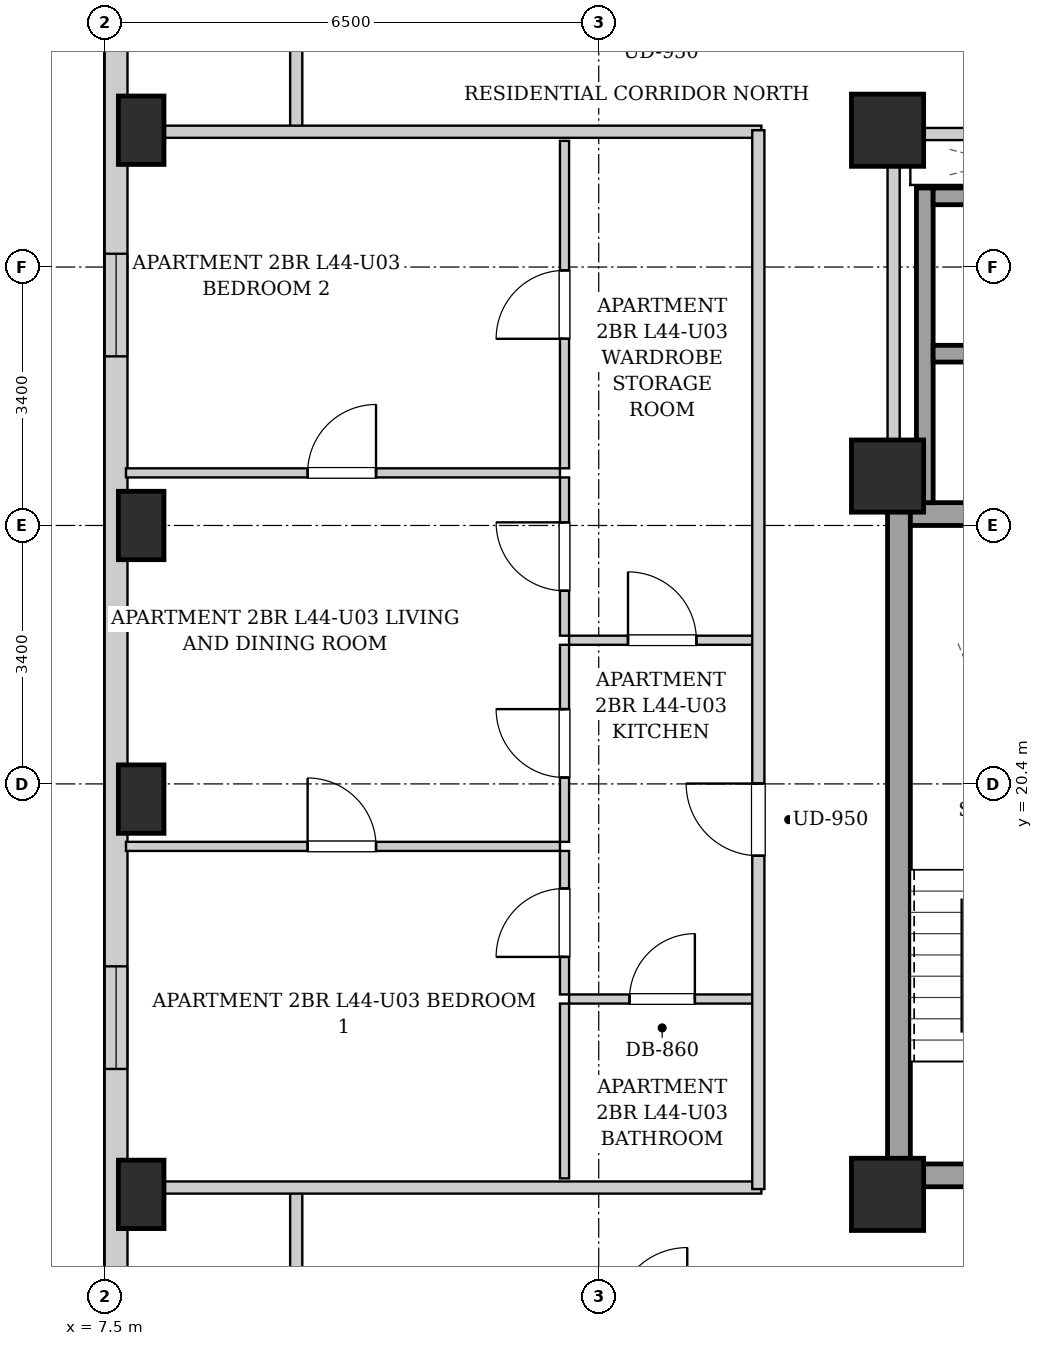
"""IFC4 building model, lengths in metres.
Left out: names, types, materials, properties, quantities, classifications, styles, units other than length and angle.
Written with IfcOpenShell. Run it as: python <this file> out.ifc"""

import sys

from ifc_helpers import new_model, si_unit, direction, frame, frame_2d, origin, origin_2d, place, context, subcontext, project, spatial, rectangle, extrude, element, fill, save


model = new_model("IFC4")
c1 = context("Model", 3, precision=1e-05, world=origin(), true_north=direction((0.0, 1.0)))
c2 = subcontext(c1, "Body", "Model", "MODEL_VIEW")
j1 = project(units=[si_unit("LENGTHUNIT", "METRE"), si_unit("PLANEANGLEUNIT", "RADIAN")], contexts=[c1])
p1 = place(None, origin())
s1 = spatial("IfcSite", under=j1, at=p1, CompositionType="ELEMENT")
p2 = place(p1, origin())
s2 = spatial("IfcBuilding", under=s1, at=p2, CompositionType="ELEMENT")
p3 = place(p2, frame((0.0, 0.0, 153.65)))
s3 = spatial("IfcBuildingStorey", under=s2, at=p3, CompositionType="ELEMENT", Elevation=153.65)
for number, where, z_axis, x_axis in (
    (1, (7.98, 15.0, 0.0), (0.0, 0.0, 1.0), (1.0, 0.0, 0.0)),
    (2, (7.98, 20.2, 0.0), (0.0, 0.0, 1.0), (1.0, 0.0, 0.0)),
    (3, (7.98, 23.8, 0.0), (0.0, 0.0, 1.0), (1.0, 0.0, 0.0)),
    (4, (7.98, 29.0, 0.0), (0.0, 0.0, 1.0), (1.0, 0.0, 0.0)),
):
    element("IfcColumn", number, at=place(p3, frame(where, z_axis=z_axis, x_axis=x_axis)), inside=s3, PredefinedType="COLUMN", context=c2, shape_type="SweptSolid", body=[
        extrude(rectangle(XDim=0.6, YDim=0.9, at=origin_2d()), origin(), (0.0, 0.0, 1.0), 3.25),
    ])
for number, where, z_axis, x_axis in (
    (5, (17.8, 15.0, 0.0), (0.0, 0.0, 1.0), (1.0, 0.0, 0.0)),
    (6, (17.8, 29.0, 0.0), (0.0, 0.0, 1.0), (1.0, 0.0, 0.0)),
    (7, (17.8, 24.45, 0.0), (0.0, 0.0, 1.0), (1.0, 0.0, 0.0)),
):
    element("IfcColumn", number, at=place(p3, frame(where, z_axis=z_axis, x_axis=x_axis)), inside=s3, PredefinedType="COLUMN", context=c2, shape_type="SweptSolid", body=[
        extrude(rectangle(XDim=0.95, YDim=0.95, at=origin_2d()), origin(), (0.0, 0.0, 1.0), 3.25),
    ])
p4 = place(p3, frame((7.65, 6.3, 0.0), z_axis=(0.0, 0.0, 1.0), x_axis=(0.0, 1.0, 0.0)))
e8 = element("IfcWall", 8, at=p4, inside=s3, PredefinedType="SOLIDWALL", context=c2, shape_type="SweptSolid", body=[
    extrude(rectangle(XDim=34.5, YDim=0.3, at=frame_2d((17.25, 0.0))), origin(), (0.0, 0.0, 1.0), 2.99),
])
p5 = place(p4, frame((1.425, 0.0, 0.55)))
e9 = element("IfcOpeningElement", 9, at=p5, cuts=e8, PredefinedType="OPENING", context=c2, shape_type="SweptSolid", body=[
    extrude(rectangle(XDim=1.35, YDim=1.2, at=frame_2d((0.675, 0.6))), frame((0.0, 0.16, 0.0), z_axis=(0.0, -1.0, 0.0), x_axis=(1.0, 0.0, 0.0)), (0.0, 0.0, 1.0), 0.32),
])
p6 = place(p4, frame((30.15, 0.0, 0.55)))
e10 = element("IfcOpeningElement", 10, at=p6, cuts=e8, PredefinedType="OPENING", context=c2, shape_type="SweptSolid", body=[
    extrude(rectangle(XDim=1.35, YDim=1.2, at=frame_2d((0.675, 0.6))), frame((0.0, 0.16, 0.0), z_axis=(0.0, -1.0, 0.0), x_axis=(1.0, 0.0, 0.0)), (0.0, 0.0, 1.0), 0.32),
])
p7 = place(p4, frame((28.31, 0.0, 0.55)))
e11 = element("IfcOpeningElement", 11, at=p7, cuts=e8, PredefinedType="OPENING", context=c2, shape_type="SweptSolid", body=[
    extrude(rectangle(XDim=1.35, YDim=1.2, at=frame_2d((0.675, 0.6))), frame((0.0, 0.16, 0.0), z_axis=(0.0, -1.0, 0.0), x_axis=(1.0, 0.0, 0.0)), (0.0, 0.0, 1.0), 0.32),
])
p8 = place(p4, frame((10.35, 0.0, 0.55)))
e12 = element("IfcOpeningElement", 12, at=p8, cuts=e8, PredefinedType="OPENING", context=c2, shape_type="SweptSolid", body=[
    extrude(rectangle(XDim=1.35, YDim=1.2, at=frame_2d((0.675, 0.6))), frame((0.0, 0.16, 0.0), z_axis=(0.0, -1.0, 0.0), x_axis=(1.0, 0.0, 0.0)), (0.0, 0.0, 1.0), 0.32),
])
p9 = place(p4, frame((19.725, 0.0, 0.55)))
e13 = element("IfcOpeningElement", 13, at=p9, cuts=e8, PredefinedType="OPENING", context=c2, shape_type="SweptSolid", body=[
    extrude(rectangle(XDim=1.35, YDim=1.2, at=frame_2d((0.675, 0.6))), frame((0.0, 0.16, 0.0), z_axis=(0.0, -1.0, 0.0), x_axis=(1.0, 0.0, 0.0)), (0.0, 0.0, 1.0), 0.32),
])
p10 = place(p3, frame((17.95, 15.1, 0.0), z_axis=(0.0, 0.0, 1.0), x_axis=(0.0, 1.0, 0.0)))
e14 = element("IfcWall", 14, at=p10, inside=s3, PredefinedType="SHEAR", context=c2, shape_type="SweptSolid", body=[
    extrude(rectangle(XDim=9.0, YDim=0.3, at=frame_2d((4.5, 0.0))), origin(), (0.0, 0.0, 1.0), 2.99),
])
p11 = place(p3, frame((18.1, 23.95, 0.0), z_axis=(0.0, 0.0, 1.0), x_axis=(1.0, 0.0, 0.0)))
e15 = element("IfcWall", 15, at=p11, inside=s3, PredefinedType="SHEAR", context=c2, shape_type="SweptSolid", body=[
    extrude(rectangle(XDim=2.85, YDim=0.3, at=frame_2d((1.425, 0.0))), origin(), (0.0, 0.0, 1.0), 2.99),
])
p12 = place(p3, frame((18.1, 15.25, 0.0), z_axis=(0.0, 0.0, 1.0), x_axis=(1.0, 0.0, 0.0)))
e16 = element("IfcWall", 16, at=p12, inside=s3, PredefinedType="SHEAR", context=c2, shape_type="SweptSolid", body=[
    extrude(rectangle(XDim=2.85, YDim=0.3, at=frame_2d((1.425, 0.0))), origin(), (0.0, 0.0, 1.0), 2.99),
])
p13 = place(p12, frame((0.86, 0.0, 0.0)))
e17 = element("IfcOpeningElement", 17, at=p13, cuts=e16, PredefinedType="OPENING", context=c2, shape_type="SweptSolid", body=[
    extrude(rectangle(XDim=1.1, YDim=2.05, at=frame_2d((0.55, 1.025))), frame((0.0, 0.16, 0.0), z_axis=(0.0, -1.0, 0.0), x_axis=(1.0, 0.0, 0.0)), (0.0, 0.0, 1.0), 0.32),
])
p14 = place(p3, frame((18.29, 24.1, 0.0), z_axis=(0.0, 0.0, 1.0), x_axis=(0.0, 1.0, 0.0)))
e18 = element("IfcWall", 18, at=p14, inside=s3, PredefinedType="SHEAR", context=c2, shape_type="SweptSolid", body=[
    extrude(rectangle(XDim=4.14, YDim=0.22, at=frame_2d((2.07, 0.0))), origin(), (0.0, 0.0, 1.0), 2.99),
])
for number, where, z_axis, x_axis in (
    (19, (18.4, 26.06, 0.0), (0.0, 0.0, 1.0), (1.0, 0.0, 0.0)),
    (20, (18.4, 28.13, 0.0), (0.0, 0.0, 1.0), (1.0, 0.0, 0.0)),
):
    element("IfcWall", number, at=place(p3, frame(where, z_axis=z_axis, x_axis=x_axis)), inside=s3, PredefinedType="SHEAR", context=c2, shape_type="SweptSolid", body=[
        extrude(rectangle(XDim=1.9, YDim=0.22, at=frame_2d((0.95, 0.0))), origin(), (0.0, 0.0, 1.0), 2.99),
    ])
p15 = place(p3, frame((17.88, 24.12, 0.0), z_axis=(0.0, 0.0, 1.0), x_axis=(0.0, 1.0, 0.0)))
e21 = element("IfcWall", 21, at=p15, inside=s3, PredefinedType="PARTITIONING", context=c2, shape_type="SweptSolid", body=[
    extrude(rectangle(XDim=4.76, YDim=0.16, at=frame_2d((2.38, 0.0))), origin(), (0.0, 0.0, 1.0), 2.99),
])
p16 = place(p3, frame((17.96, 28.95, 0.0), z_axis=(0.0, 0.0, 1.0), x_axis=(1.0, 0.0, 0.0)))
e22 = element("IfcWall", 22, at=p16, inside=s3, PredefinedType="PARTITIONING", context=c2, shape_type="SweptSolid", body=[
    extrude(rectangle(XDim=4.29, YDim=0.16, at=frame_2d((2.145, 0.0))), origin(), (0.0, 0.0, 1.0), 2.442),
])
p17 = place(p16, frame((1.695, 0.0, 0.0)))
e23 = element("IfcOpeningElement", 23, at=p17, cuts=e22, PredefinedType="OPENING", context=c2, shape_type="SweptSolid", body=[
    extrude(rectangle(XDim=0.86, YDim=2.05, at=frame_2d((0.43, 1.025))), frame((0.0, 0.09, 0.0), z_axis=(0.0, -1.0, 0.0), x_axis=(1.0, 0.0, 0.0)), (0.0, 0.0, 1.0), 0.18),
])
for number, where, z_axis, x_axis in (
    (24, (10.02, 13.35, 0.0), (0.0, 0.0, 1.0), (0.0, 1.0, 0.0)),
    (25, (10.02, 28.98, 0.0), (0.0, 0.0, 1.0), (0.0, 1.0, 0.0)),
):
    element("IfcWall", number, at=place(p3, frame(where, z_axis=z_axis, x_axis=x_axis)), inside=s3, PredefinedType="PARTITIONING", context=c2, shape_type="SweptSolid", body=[
        extrude(rectangle(XDim=1.74, YDim=0.16, at=frame_2d((0.87, 0.0))), origin(), (0.0, 0.0, 1.0), 2.99),
    ])
for number, where, z_axis, x_axis in (
    (26, (7.78, 15.09, 0.0), (0.0, 0.0, 1.0), (1.0, 0.0, 0.0)),
    (27, (7.78, 28.98, 0.0), (0.0, 0.0, 1.0), (1.0, 0.0, 0.0)),
):
    element("IfcWall", number, at=place(p3, frame(where, z_axis=z_axis, x_axis=x_axis)), inside=s3, PredefinedType="PARTITIONING", context=c2, shape_type="SweptSolid", body=[
        extrude(rectangle(XDim=8.36, YDim=0.16, at=frame_2d((4.18, 0.0))), origin(), (0.0, 0.0, 1.0), 2.442),
    ])
p18 = place(p3, frame((13.61, 22.29, 0.0), z_axis=(0.0, 0.0, 1.0), x_axis=(1.0, 0.0, 0.0)))
e28 = element("IfcWall", 28, at=p18, inside=s3, PredefinedType="PARTITIONING", context=c2, shape_type="SweptSolid", body=[
    extrude(rectangle(XDim=2.45, YDim=0.12, at=frame_2d((1.225, 0.0))), origin(), (0.0, 0.0, 1.0), 2.99),
])
p19 = place(p18, frame((0.775, 0.0, 0.0)))
e29 = element("IfcOpeningElement", 29, at=p19, cuts=e28, PredefinedType="OPENING", context=c2, shape_type="SweptSolid", body=[
    extrude(rectangle(XDim=0.9, YDim=2.05, at=frame_2d((0.45, 1.025))), frame((0.0, 0.07, 0.0), z_axis=(0.0, -1.0, 0.0), x_axis=(1.0, 0.0, 0.0)), (0.0, 0.0, 1.0), 0.14),
])
p20 = place(p3, frame((13.55, 22.35, 0.0), z_axis=(0.0, 0.0, 1.0), x_axis=(0.0, 1.0, 0.0)))
e30 = element("IfcWall", 30, at=p20, inside=s3, PredefinedType="PARTITIONING", context=c2, shape_type="SweptSolid", body=[
    extrude(rectangle(XDim=2.082, YDim=0.12, at=frame_2d((1.041, 0.0))), origin(), (0.0, 0.0, 1.0), 2.99),
])
p21 = place(p20, frame((0.591, 0.0, 0.0)))
e31 = element("IfcOpeningElement", 31, at=p21, cuts=e30, PredefinedType="OPENING", context=c2, shape_type="SweptSolid", body=[
    extrude(rectangle(XDim=0.9, YDim=2.05, at=frame_2d((0.45, 1.025))), frame((0.0, 0.07, 0.0), z_axis=(0.0, -1.0, 0.0), x_axis=(1.0, 0.0, 0.0)), (0.0, 0.0, 1.0), 0.14),
])
p22 = place(p3, frame((13.55, 24.552, 0.0), z_axis=(0.0, 0.0, 1.0), x_axis=(0.0, 1.0, 0.0)))
e32 = element("IfcWall", 32, at=p22, inside=s3, PredefinedType="PARTITIONING", context=c2, shape_type="SweptSolid", body=[
    extrude(rectangle(XDim=4.308, YDim=0.12, at=frame_2d((2.154, 0.0))), origin(), (0.0, 0.0, 1.0), 2.99),
])
p23 = place(p22, frame((1.704, 0.0, 0.0)))
e33 = element("IfcOpeningElement", 33, at=p23, cuts=e32, PredefinedType="OPENING", context=c2, shape_type="SweptSolid", body=[
    extrude(rectangle(XDim=0.9, YDim=2.05, at=frame_2d((0.45, 1.025))), frame((0.0, 0.07, 0.0), z_axis=(0.0, -1.0, 0.0), x_axis=(1.0, 0.0, 0.0)), (0.0, 0.0, 1.0), 0.14),
])
p24 = place(p3, frame((13.61, 17.57, 0.0), z_axis=(0.0, 0.0, 1.0), x_axis=(1.0, 0.0, 0.0)))
e34 = element("IfcWall", 34, at=p24, inside=s3, PredefinedType="PARTITIONING", context=c2, shape_type="SweptSolid", body=[
    extrude(rectangle(XDim=2.45, YDim=0.12, at=frame_2d((1.225, 0.0))), origin(), (0.0, 0.0, 1.0), 2.99),
])
p25 = place(p24, frame((0.795, 0.0, 0.0)))
e35 = element("IfcOpeningElement", 35, at=p25, cuts=e34, PredefinedType="OPENING", context=c2, shape_type="SweptSolid", body=[
    extrude(rectangle(XDim=0.86, YDim=2.05, at=frame_2d((0.43, 1.025))), frame((0.0, 0.07, 0.0), z_axis=(0.0, -1.0, 0.0), x_axis=(1.0, 0.0, 0.0)), (0.0, 0.0, 1.0), 0.14),
])
p26 = place(p3, frame((13.55, 15.21, 0.0), z_axis=(0.0, 0.0, 1.0), x_axis=(0.0, 1.0, 0.0)))
e36 = element("IfcWall", 36, at=p26, inside=s3, PredefinedType="PARTITIONING", context=c2, shape_type="SweptSolid", body=[
    extrude(rectangle(XDim=2.3, YDim=0.12, at=frame_2d((1.15, 0.0))), origin(), (0.0, 0.0, 1.0), 2.99),
])
p27 = place(p3, frame((13.55, 17.63, 0.0), z_axis=(0.0, 0.0, 1.0), x_axis=(0.0, 1.0, 0.0)))
e37 = element("IfcWall", 37, at=p27, inside=s3, PredefinedType="PARTITIONING", context=c2, shape_type="SweptSolid", body=[
    extrude(rectangle(XDim=1.888, YDim=0.12, at=frame_2d((0.944, 0.0))), origin(), (0.0, 0.0, 1.0), 2.99),
])
p28 = place(p27, frame((0.494, 0.0, 0.0)))
e38 = element("IfcOpeningElement", 38, at=p28, cuts=e37, PredefinedType="OPENING", context=c2, shape_type="SweptSolid", body=[
    extrude(rectangle(XDim=0.9, YDim=2.05, at=frame_2d((0.45, 1.025))), frame((0.0, 0.07, 0.0), z_axis=(0.0, -1.0, 0.0), x_axis=(1.0, 0.0, 0.0)), (0.0, 0.0, 1.0), 0.14),
])
p29 = place(p3, frame((13.55, 19.638, 0.0), z_axis=(0.0, 0.0, 1.0), x_axis=(0.0, 1.0, 0.0)))
e39 = element("IfcWall", 39, at=p29, inside=s3, PredefinedType="PARTITIONING", context=c2, shape_type="SweptSolid", body=[
    extrude(rectangle(XDim=2.592, YDim=0.12, at=frame_2d((1.296, 0.0))), origin(), (0.0, 0.0, 1.0), 2.99),
])
p30 = place(p29, frame((0.846, 0.0, 0.0)))
e40 = element("IfcOpeningElement", 40, at=p30, cuts=e39, PredefinedType="OPENING", context=c2, shape_type="SweptSolid", body=[
    extrude(rectangle(XDim=0.9, YDim=2.05, at=frame_2d((0.45, 1.025))), frame((0.0, 0.07, 0.0), z_axis=(0.0, -1.0, 0.0), x_axis=(1.0, 0.0, 0.0)), (0.0, 0.0, 1.0), 0.14),
])
p31 = place(p3, frame((7.78, 19.578, 0.0), z_axis=(0.0, 0.0, 1.0), x_axis=(1.0, 0.0, 0.0)))
e41 = element("IfcWall", 41, at=p31, inside=s3, PredefinedType="PARTITIONING", context=c2, shape_type="SweptSolid", body=[
    extrude(rectangle(XDim=5.71, YDim=0.12, at=frame_2d((2.855, 0.0))), origin(), (0.0, 0.0, 1.0), 2.99),
])
p32 = place(p31, frame((2.39, 0.0, 0.0)))
e42 = element("IfcOpeningElement", 42, at=p32, cuts=e41, PredefinedType="OPENING", context=c2, shape_type="SweptSolid", body=[
    extrude(rectangle(XDim=0.9, YDim=2.05, at=frame_2d((0.45, 1.025))), frame((0.0, 0.07, 0.0), z_axis=(0.0, -1.0, 0.0), x_axis=(1.0, 0.0, 0.0)), (0.0, 0.0, 1.0), 0.14),
])
p33 = place(p3, frame((7.78, 24.492, 0.0), z_axis=(0.0, 0.0, 1.0), x_axis=(1.0, 0.0, 0.0)))
e43 = element("IfcWall", 43, at=p33, inside=s3, PredefinedType="PARTITIONING", context=c2, shape_type="SweptSolid", body=[
    extrude(rectangle(XDim=5.71, YDim=0.12, at=frame_2d((2.855, 0.0))), origin(), (0.0, 0.0, 1.0), 2.621),
])
p34 = place(p33, frame((2.39, 0.0, 0.0)))
e44 = element("IfcOpeningElement", 44, at=p34, cuts=e43, PredefinedType="OPENING", context=c2, shape_type="SweptSolid", body=[
    extrude(rectangle(XDim=0.9, YDim=2.05, at=frame_2d((0.45, 1.025))), frame((0.0, 0.07, 0.0), z_axis=(0.0, -1.0, 0.0), x_axis=(1.0, 0.0, 0.0)), (0.0, 0.0, 1.0), 0.14),
])
p35 = place(p3, frame((16.1, 15.07, 0.0), z_axis=(0.0, 0.0, 1.0), x_axis=(0.0, 1.0, 0.0)))
e45 = element("IfcWall", 45, at=p35, inside=s3, PredefinedType="PARTITIONING", context=c2, shape_type="SweptSolid", body=[
    extrude(rectangle(XDim=13.93, YDim=0.16, at=frame_2d((6.965, 0.0))), origin(), (0.0, 0.0, 1.0), 2.99),
])
p36 = place(p35, frame((4.385, 0.0, 0.0)))
e46 = element("IfcOpeningElement", 46, at=p36, cuts=e45, PredefinedType="OPENING", context=c2, shape_type="SweptSolid", body=[
    extrude(rectangle(XDim=0.95, YDim=2.1, at=frame_2d((0.475, 1.05))), frame((0.0, 0.09, 0.0), z_axis=(0.0, -1.0, 0.0), x_axis=(1.0, 0.0, 0.0)), (0.0, 0.0, 1.0), 0.18),
])
p37 = place(p19, origin())
e47 = element("IfcDoor", 47, at=p37, inside=s3, OperationType="SINGLE_SWING_LEFT", PredefinedType="DOOR", context=c2, shape_type="SweptSolid", body=[
    extrude(rectangle(XDim=0.9, YDim=2.05, at=frame_2d((0.45, 1.025))), frame((0.0, 0.025, 0.0), z_axis=(0.0, -1.0, 0.0), x_axis=(1.0, 0.0, 0.0)), (0.0, 0.0, 1.0), 0.05),
])
fill(e29, e47)
p38 = place(p21, origin())
e48 = element("IfcDoor", 48, at=p38, inside=s3, OperationType="SINGLE_SWING_RIGHT", PredefinedType="DOOR", context=c2, shape_type="SweptSolid", body=[
    extrude(rectangle(XDim=0.9, YDim=2.05, at=frame_2d((0.45, 1.025))), frame((0.0, 0.025, 0.0), z_axis=(0.0, -1.0, 0.0), x_axis=(1.0, 0.0, 0.0)), (0.0, 0.0, 1.0), 0.05),
])
fill(e31, e48)
p39 = place(p23, origin())
e49 = element("IfcDoor", 49, at=p39, inside=s3, OperationType="SINGLE_SWING_LEFT", PredefinedType="DOOR", context=c2, shape_type="SweptSolid", body=[
    extrude(rectangle(XDim=0.9, YDim=2.05, at=frame_2d((0.45, 1.025))), frame((0.0, 0.025, 0.0), z_axis=(0.0, -1.0, 0.0), x_axis=(1.0, 0.0, 0.0)), (0.0, 0.0, 1.0), 0.05),
])
fill(e33, e49)
p40 = place(p25, origin())
e50 = element("IfcDoor", 50, at=p40, inside=s3, OperationType="SINGLE_SWING_RIGHT", PredefinedType="DOOR", context=c2, shape_type="SweptSolid", body=[
    extrude(rectangle(XDim=0.86, YDim=2.05, at=frame_2d((0.43, 1.025))), frame((0.0, 0.025, 0.0), z_axis=(0.0, -1.0, 0.0), x_axis=(1.0, 0.0, 0.0)), (0.0, 0.0, 1.0), 0.05),
])
fill(e35, e50)
p41 = place(p28, origin())
e51 = element("IfcDoor", 51, at=p41, inside=s3, OperationType="SINGLE_SWING_LEFT", PredefinedType="DOOR", context=c2, shape_type="SweptSolid", body=[
    extrude(rectangle(XDim=0.9, YDim=2.05, at=frame_2d((0.45, 1.025))), frame((0.0, 0.025, 0.0), z_axis=(0.0, -1.0, 0.0), x_axis=(1.0, 0.0, 0.0)), (0.0, 0.0, 1.0), 0.05),
])
fill(e38, e51)
p42 = place(p30, origin())
e52 = element("IfcDoor", 52, at=p42, inside=s3, OperationType="SINGLE_SWING_RIGHT", PredefinedType="DOOR", context=c2, shape_type="SweptSolid", body=[
    extrude(rectangle(XDim=0.9, YDim=2.05, at=frame_2d((0.45, 1.025))), frame((0.0, 0.025, 0.0), z_axis=(0.0, -1.0, 0.0), x_axis=(1.0, 0.0, 0.0)), (0.0, 0.0, 1.0), 0.05),
])
fill(e40, e52)
p43 = place(p32, origin())
e53 = element("IfcDoor", 53, at=p43, inside=s3, OperationType="SINGLE_SWING_LEFT", PredefinedType="DOOR", context=c2, shape_type="SweptSolid", body=[
    extrude(rectangle(XDim=0.9, YDim=2.05, at=frame_2d((0.45, 1.025))), frame((0.0, 0.025, 0.0), z_axis=(0.0, -1.0, 0.0), x_axis=(1.0, 0.0, 0.0)), (0.0, 0.0, 1.0), 0.05),
])
fill(e42, e53)
p44 = place(p34, origin())
e54 = element("IfcDoor", 54, at=p44, inside=s3, OperationType="SINGLE_SWING_RIGHT", PredefinedType="DOOR", context=c2, shape_type="SweptSolid", body=[
    extrude(rectangle(XDim=0.9, YDim=2.05, at=frame_2d((0.45, 1.025))), frame((0.0, 0.025, 0.0), z_axis=(0.0, -1.0, 0.0), x_axis=(1.0, 0.0, 0.0)), (0.0, 0.0, 1.0), 0.05),
])
fill(e44, e54)
p45 = place(p36, origin())
e55 = element("IfcDoor", 55, at=p45, inside=s3, OperationType="SINGLE_SWING_RIGHT", PredefinedType="DOOR", context=c2, shape_type="SweptSolid", body=[
    extrude(rectangle(XDim=0.95, YDim=2.1, at=frame_2d((0.475, 1.05))), frame((0.0, 0.025, 0.0), z_axis=(0.0, -1.0, 0.0), x_axis=(1.0, 0.0, 0.0)), (0.0, 0.0, 1.0), 0.05),
])
fill(e46, e55)
p46 = place(p8, origin())
e56 = element("IfcWindow", 56, at=p46, inside=s3, PartitioningType="SINGLE_PANEL", PredefinedType="WINDOW", context=c2, shape_type="SweptSolid", body=[
    extrude(rectangle(XDim=1.35, YDim=1.2, at=frame_2d((0.675, 0.6))), frame((0.0, 0.03, 0.0), z_axis=(0.0, -1.0, 0.0), x_axis=(1.0, 0.0, 0.0)), (0.0, 0.0, 1.0), 0.06),
])
fill(e12, e56)
p47 = place(p9, origin())
e57 = element("IfcWindow", 57, at=p47, inside=s3, PartitioningType="SINGLE_PANEL", PredefinedType="WINDOW", context=c2, shape_type="SweptSolid", body=[
    extrude(rectangle(XDim=1.35, YDim=1.2, at=frame_2d((0.675, 0.6))), frame((0.0, 0.03, 0.0), z_axis=(0.0, -1.0, 0.0), x_axis=(1.0, 0.0, 0.0)), (0.0, 0.0, 1.0), 0.06),
])
fill(e13, e57)
save(model, sys.argv[1])
